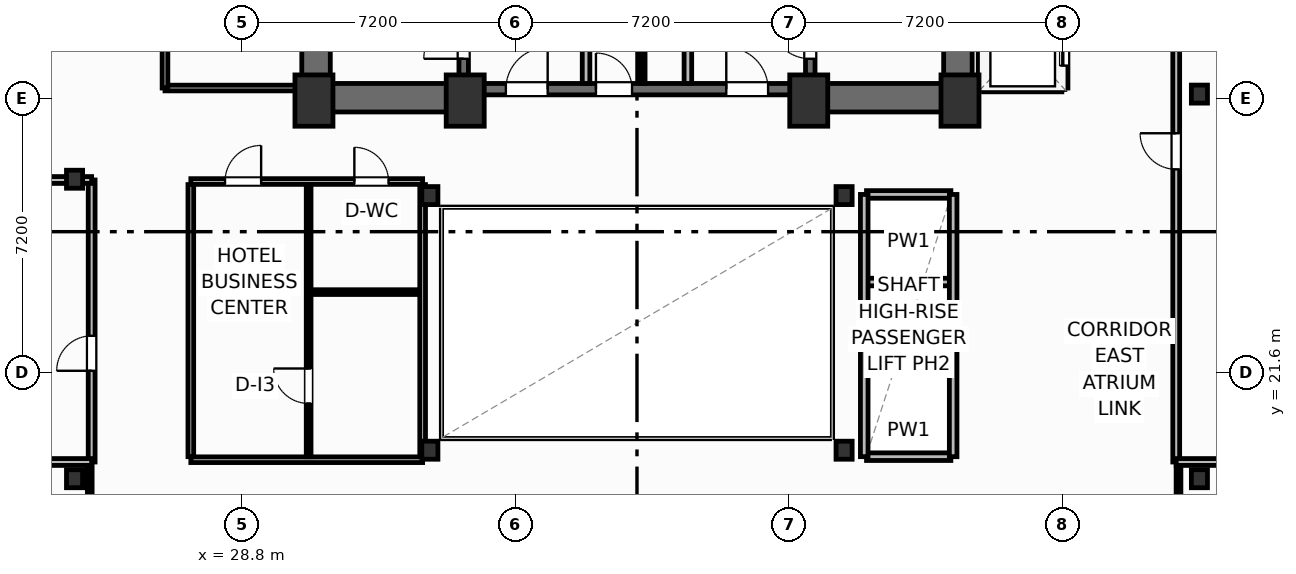
"""IFC4 building model, lengths in metres.
Left out: names, types, materials, properties, quantities, classifications, styles, units other than length and angle.
Written with IfcOpenShell. Run it as: python <this file> out.ifc"""

import sys

from ifc_helpers import new_model, si_unit, direction, frame, frame_2d, origin, origin_2d, place, context, subcontext, project, spatial, rectangle, i_section, extrude, element, fill, save


model = new_model("IFC4")
c1 = context("Model", 3, precision=1e-05, world=origin(), true_north=direction((0.0, 1.0)))
c2 = subcontext(c1, "Body", "Model", "MODEL_VIEW")
j1 = project(units=[si_unit("LENGTHUNIT", "METRE"), si_unit("PLANEANGLEUNIT", "RADIAN")], contexts=[c1])
p1 = place(None, origin())
s1 = spatial("IfcSite", under=j1, at=p1, CompositionType="ELEMENT")
p2 = place(p1, origin())
s2 = spatial("IfcBuilding", under=s1, at=p2, CompositionType="ELEMENT")
p3 = place(p2, frame((0.0, 0.0, 136.5)))
s3 = spatial("IfcBuildingStorey", under=s2, at=p3, CompositionType="ELEMENT", Elevation=136.5)
for number, where, z_axis, x_axis in (
    (1, (30.7, 28.75, 0.0), (0.0, 0.0, 1.0), (1.0, 0.0, 0.0)),
    (2, (34.68, 28.75, 0.0), (0.0, 0.0, 1.0), (1.0, 0.0, 0.0)),
    (3, (43.72, 28.75, 0.0), (0.0, 0.0, 1.0), (1.0, 0.0, 0.0)),
    (4, (47.7, 28.75, 0.0), (0.0, 0.0, 1.0), (1.0, 0.0, 0.0)),
):
    element("IfcColumn", number, at=place(p3, frame(where, z_axis=z_axis, x_axis=x_axis)), inside=s3, PredefinedType="COLUMN", context=c2, shape_type="SweptSolid", body=[
        extrude(rectangle(XDim=1.0, YDim=1.35, at=origin_2d()), origin(), (0.0, 0.0, 1.0), 3.7),
    ])
for number, where, z_axis, x_axis in (
    (5, (33.75, 19.55, 0.0), (0.0, 0.0, 1.0), (1.0, 0.0, 0.0)),
    (6, (44.65, 19.55, 0.0), (0.0, 0.0, 1.0), (1.0, 0.0, 0.0)),
    (7, (33.75, 26.25, 0.0), (0.0, 0.0, 1.0), (1.0, 0.0, 0.0)),
    (8, (44.65, 26.25, 0.0), (0.0, 0.0, 1.0), (1.0, 0.0, 0.0)),
    (9, (24.4, 18.8, 0.0), (0.0, 0.0, 1.0), (1.0, 0.0, 0.0)),
    (10, (24.4, 26.68, 0.0), (0.0, 0.0, 1.0), (1.0, 0.0, 0.0)),
    (11, (54.0, 18.8, 0.0), (0.0, 0.0, 1.0), (1.0, 0.0, 0.0)),
    (12, (54.0, 28.92, 0.0), (0.0, 0.0, 1.0), (1.0, 0.0, 0.0)),
):
    element("IfcColumn", number, at=place(p3, frame(where, z_axis=z_axis, x_axis=x_axis)), inside=s3, PredefinedType="COLUMN", context=c2, shape_type="SweptSolid", body=[
        extrude(i_section(OverallWidth=0.424, OverallDepth=0.474, WebThickness=0.048, FlangeThickness=0.077, FilletRadius=0.025, at=origin_2d()), origin(), (0.0, 0.0, 1.0), 3.7),
    ])
for number, where, z_axis, x_axis in (
    (13, (30.755, 29.2, 0.0), (0.0, 0.0, 1.0), (0.0, 1.0, 0.0)),
    (14, (47.645, 29.2, 0.0), (0.0, 0.0, 1.0), (0.0, 1.0, 0.0)),
):
    element("IfcWall", number, at=place(p3, frame(where, z_axis=z_axis, x_axis=x_axis)), inside=s3, PredefinedType="SHEAR", context=c2, shape_type="SweptSolid", body=[
        extrude(rectangle(XDim=9.22, YDim=0.75, at=frame_2d((4.61, 0.0))), origin(), (0.0, 0.0, 1.0), 3.45),
    ])
p4 = place(p3, frame((30.38, 28.825, 0.0), z_axis=(0.0, 0.0, 1.0), x_axis=(1.0, 0.0, 0.0)))
e15 = element("IfcWall", 15, at=p4, inside=s3, PredefinedType="SHEAR", context=c2, shape_type="SweptSolid", body=[
    extrude(rectangle(XDim=4.42, YDim=0.75, at=frame_2d((2.21, 0.0))), origin(), (0.0, 0.0, 1.0), 3.45),
])
p5 = place(p3, frame((43.6, 28.825, 0.0), z_axis=(0.0, 0.0, 1.0), x_axis=(1.0, 0.0, 0.0)))
e16 = element("IfcWall", 16, at=p5, inside=s3, PredefinedType="SHEAR", context=c2, shape_type="SweptSolid", body=[
    extrude(rectangle(XDim=4.42, YDim=0.75, at=frame_2d((2.21, 0.0))), origin(), (0.0, 0.0, 1.0), 3.45),
])
p6 = place(p3, frame((34.8, 29.05, 0.0), z_axis=(0.0, 0.0, 1.0), x_axis=(1.0, 0.0, 0.0)))
e17 = element("IfcWall", 17, at=p6, inside=s3, PredefinedType="SHEAR", context=c2, shape_type="SweptSolid", body=[
    extrude(rectangle(XDim=8.8, YDim=0.3, at=frame_2d((4.4, 0.0))), origin(), (0.0, 0.0, 1.0), 3.45),
])
p7 = place(p6, frame((0.95, 0.0, 0.0)))
e18 = element("IfcOpeningElement", 18, at=p7, cuts=e17, PredefinedType="OPENING", context=c2, shape_type="SweptSolid", body=[
    extrude(rectangle(XDim=1.1, YDim=2.15, at=frame_2d((0.55, 1.075))), frame((0.0, 0.16, 0.0), z_axis=(0.0, -1.0, 0.0), x_axis=(1.0, 0.0, 0.0)), (0.0, 0.0, 1.0), 0.32),
])
p8 = place(p6, frame((6.75, 0.0, 0.0)))
e19 = element("IfcOpeningElement", 19, at=p8, cuts=e17, PredefinedType="OPENING", context=c2, shape_type="SweptSolid", body=[
    extrude(rectangle(XDim=1.1, YDim=2.15, at=frame_2d((0.55, 1.075))), frame((0.0, 0.16, 0.0), z_axis=(0.0, -1.0, 0.0), x_axis=(1.0, 0.0, 0.0)), (0.0, 0.0, 1.0), 0.32),
])
p9 = place(p6, frame((3.32, 0.0, 0.0)))
e20 = element("IfcOpeningElement", 20, at=p9, cuts=e17, PredefinedType="OPENING", context=c2, shape_type="SweptSolid", body=[
    extrude(rectangle(XDim=0.95, YDim=2.15, at=frame_2d((0.475, 1.075))), frame((0.0, 0.16, 0.0), z_axis=(0.0, -1.0, 0.0), x_axis=(1.0, 0.0, 0.0)), (0.0, 0.0, 1.0), 0.32),
])
p10 = place(p3, frame((34.64, 29.2, 0.0), z_axis=(0.0, 0.0, 1.0), x_axis=(0.0, 1.0, 0.0)))
e21 = element("IfcWall", 21, at=p10, inside=s3, PredefinedType="SHEAR", context=c2, shape_type="SweptSolid", body=[
    extrude(rectangle(XDim=9.22, YDim=0.25, at=frame_2d((4.61, 0.0))), origin(), (0.0, 0.0, 1.0), 3.45),
])
p11 = place(p10, frame((0.65, 0.0, 0.0)))
e22 = element("IfcOpeningElement", 22, at=p11, cuts=e21, PredefinedType="OPENING", context=c2, shape_type="SweptSolid", body=[
    extrude(rectangle(XDim=1.05, YDim=2.15, at=frame_2d((0.525, 1.075))), frame((0.0, 0.135, 0.0), z_axis=(0.0, -1.0, 0.0), x_axis=(1.0, 0.0, 0.0)), (0.0, 0.0, 1.0), 0.27),
])
p12 = place(p3, frame((43.76, 29.2, 0.0), z_axis=(0.0, 0.0, 1.0), x_axis=(0.0, 1.0, 0.0)))
e23 = element("IfcWall", 23, at=p12, inside=s3, PredefinedType="SHEAR", context=c2, shape_type="SweptSolid", body=[
    extrude(rectangle(XDim=9.22, YDim=0.25, at=frame_2d((4.61, 0.0))), origin(), (0.0, 0.0, 1.0), 3.45),
])
p13 = place(p12, frame((0.65, 0.0, 0.0)))
e24 = element("IfcOpeningElement", 24, at=p13, cuts=e23, PredefinedType="OPENING", context=c2, shape_type="SweptSolid", body=[
    extrude(rectangle(XDim=1.05, YDim=2.15, at=frame_2d((0.525, 1.075))), frame((0.0, 0.135, 0.0), z_axis=(0.0, -1.0, 0.0), x_axis=(1.0, 0.0, 0.0)), (0.0, 0.0, 1.0), 0.27),
])
p14 = place(p3, frame((24.8, 16.61, 0.0), z_axis=(0.0, 0.0, 1.0), x_axis=(0.0, 1.0, 0.0)))
e25 = element("IfcWall", 25, at=p14, inside=s3, PredefinedType="PARTITIONING", context=c2, shape_type="SweptSolid", body=[
    extrude(rectangle(XDim=2.63, YDim=0.125, at=frame_2d((1.315, 0.0))), origin(), (0.0, 0.0, 1.0), 2.662),
])
p15 = place(p3, frame((53.45, 16.61, 0.0), z_axis=(0.0, 0.0, 1.0), x_axis=(0.0, 1.0, 0.0)))
e26 = element("IfcWall", 26, at=p15, inside=s3, PredefinedType="PARTITIONING", context=c2, shape_type="SweptSolid", body=[
    extrude(rectangle(XDim=2.63, YDim=0.125, at=frame_2d((1.315, 0.0))), origin(), (0.0, 0.0, 1.0), 3.45),
])
p16 = place(p3, frame((24.85, 19.24, 0.0), z_axis=(0.0, 0.0, 1.0), x_axis=(0.0, 1.0, 0.0)))
e27 = element("IfcWall", 27, at=p16, inside=s3, PredefinedType="PARTITIONING", context=c2, shape_type="SweptSolid", body=[
    extrude(rectangle(XDim=7.42, YDim=0.18, at=frame_2d((3.71, 0.0))), origin(), (0.0, 0.0, 1.0), 3.45),
])
p17 = place(p16, frame((2.4, 0.0, 0.0)))
e28 = element("IfcOpeningElement", 28, at=p17, cuts=e27, PredefinedType="OPENING", context=c2, shape_type="SweptSolid", body=[
    extrude(rectangle(XDim=0.92, YDim=2.05, at=frame_2d((0.46, 1.025))), frame((0.0, 0.1, 0.0), z_axis=(0.0, -1.0, 0.0), x_axis=(1.0, 0.0, 0.0)), (0.0, 0.0, 1.0), 0.2),
])
p18 = place(p3, frame((19.2, 19.24, 0.0), z_axis=(0.0, 0.0, 1.0), x_axis=(1.0, 0.0, 0.0)))
e29 = element("IfcWall", 29, at=p18, inside=s3, PredefinedType="PARTITIONING", context=c2, shape_type="SweptSolid", body=[
    extrude(rectangle(XDim=5.65, YDim=0.18, at=frame_2d((2.825, 0.0))), origin(), (0.0, 0.0, 1.0), 3.45),
])
p19 = place(p3, frame((2.073, 26.66, 0.0), z_axis=(0.0, 0.0, 1.0), x_axis=(1.0, 0.0, 0.0)))
e30 = element("IfcWall", 30, at=p19, inside=s3, PredefinedType="PARTITIONING", context=c2, shape_type="SweptSolid", body=[
    extrude(rectangle(XDim=22.777, YDim=0.18, at=frame_2d((11.388, 0.0))), origin(), (0.0, 0.0, 1.0), 2.662),
])
p20 = place(p3, frame((53.39, 19.24, 0.0), z_axis=(0.0, 0.0, 1.0), x_axis=(0.0, 1.0, 0.0)))
e31 = element("IfcWall", 31, at=p20, inside=s3, PredefinedType="PARTITIONING", context=c2, shape_type="SweptSolid", body=[
    extrude(rectangle(XDim=20.06, YDim=0.18, at=frame_2d((10.03, 0.0))), origin(), (0.0, 0.0, 1.0), 3.45),
])
p21 = place(p20, frame((7.7, 0.0, 0.0)))
e32 = element("IfcOpeningElement", 32, at=p21, cuts=e31, PredefinedType="OPENING", context=c2, shape_type="SweptSolid", body=[
    extrude(rectangle(XDim=0.95, YDim=2.05, at=frame_2d((0.475, 1.025))), frame((0.0, 0.1, 0.0), z_axis=(0.0, -1.0, 0.0), x_axis=(1.0, 0.0, 0.0)), (0.0, 0.0, 1.0), 0.2),
])
p22 = place(p3, frame((53.39, 19.24, 0.0), z_axis=(0.0, 0.0, 1.0), x_axis=(1.0, 0.0, 0.0)))
e33 = element("IfcWall", 33, at=p22, inside=s3, PredefinedType="PARTITIONING", context=c2, shape_type="SweptSolid", body=[
    extrude(rectangle(XDim=22.367, YDim=0.18, at=frame_2d((11.183, 0.0))), origin(), (0.0, 0.0, 1.0), 2.662),
])
for number, where, z_axis, x_axis in (
    (34, (37.86, 29.2, 0.0), (0.0, 0.0, 1.0), (0.0, 1.0, 0.0)),
    (35, (40.54, 29.2, 0.0), (0.0, 0.0, 1.0), (0.0, 1.0, 0.0)),
):
    element("IfcWall", number, at=place(p3, frame(where, z_axis=z_axis, x_axis=x_axis)), inside=s3, PredefinedType="PARTITIONING", context=c2, shape_type="SweptSolid", body=[
        extrude(rectangle(XDim=5.18, YDim=0.2, at=frame_2d((2.59, 0.0))), origin(), (0.0, 0.0, 1.0), 3.45),
    ])
p23 = place(p3, frame((39.35, 29.2, 0.0), z_axis=(0.0, 0.0, 1.0), x_axis=(0.0, 1.0, 0.0)))
e36 = element("IfcWall", 36, at=p23, inside=s3, PredefinedType="PARTITIONING", context=c2, shape_type="SweptSolid", body=[
    extrude(rectangle(XDim=5.22, YDim=0.125, at=frame_2d((2.61, 0.0))), origin(), (0.0, 0.0, 1.0), 3.45),
])
p24 = place(p23, frame((2.05, 0.0, 0.0)))
e37 = element("IfcOpeningElement", 37, at=p24, cuts=e36, PredefinedType="OPENING", context=c2, shape_type="SweptSolid", body=[
    extrude(rectangle(XDim=0.85, YDim=2.05, at=frame_2d((0.425, 1.025))), frame((0.0, 0.073, 0.0), z_axis=(0.0, -1.0, 0.0), x_axis=(1.0, 0.0, 0.0)), (0.0, 0.0, 1.0), 0.145),
])
p25 = place(p3, frame((27.46, 26.62, 0.0), z_axis=(0.0, 0.0, 1.0), x_axis=(1.0, 0.0, 0.0)))
e38 = element("IfcWall", 38, at=p25, inside=s3, PredefinedType="PARTITIONING", context=c2, shape_type="SweptSolid", body=[
    extrude(rectangle(XDim=6.1, YDim=0.15, at=frame_2d((3.05, 0.0))), origin(), (0.0, 0.0, 1.0), 2.662),
])
p26 = place(p25, frame((0.9, 0.0, 0.0)))
e39 = element("IfcOpeningElement", 39, at=p26, cuts=e38, PredefinedType="OPENING", context=c2, shape_type="SweptSolid", body=[
    extrude(rectangle(XDim=0.95, YDim=2.05, at=frame_2d((0.475, 1.025))), frame((0.0, 0.085, 0.0), z_axis=(0.0, -1.0, 0.0), x_axis=(1.0, 0.0, 0.0)), (0.0, 0.0, 1.0), 0.17),
])
p27 = place(p25, frame((4.303, 0.0, 0.0)))
e40 = element("IfcOpeningElement", 40, at=p27, cuts=e38, PredefinedType="OPENING", context=c2, shape_type="SweptSolid", body=[
    extrude(rectangle(XDim=0.9, YDim=2.05, at=frame_2d((0.45, 1.025))), frame((0.0, 0.085, 0.0), z_axis=(0.0, -1.0, 0.0), x_axis=(1.0, 0.0, 0.0)), (0.0, 0.0, 1.0), 0.17),
])
p28 = place(p3, frame((27.46, 19.3, 0.0), z_axis=(0.0, 0.0, 1.0), x_axis=(1.0, 0.0, 0.0)))
e41 = element("IfcWall", 41, at=p28, inside=s3, PredefinedType="PARTITIONING", context=c2, shape_type="SweptSolid", body=[
    extrude(rectangle(XDim=6.1, YDim=0.15, at=frame_2d((3.05, 0.0))), origin(), (0.0, 0.0, 1.0), 2.662),
])
p29 = place(p3, frame((30.56, 19.38, 0.0), z_axis=(0.0, 0.0, 1.0), x_axis=(0.0, 1.0, 0.0)))
e42 = element("IfcWall", 42, at=p29, inside=s3, PredefinedType="PARTITIONING", context=c2, shape_type="SweptSolid", body=[
    extrude(rectangle(XDim=7.16, YDim=0.125, at=frame_2d((3.58, 0.0))), origin(), (0.0, 0.0, 1.0), 3.45),
])
p30 = place(p29, frame((1.4, 0.0, 0.0)))
e43 = element("IfcOpeningElement", 43, at=p30, cuts=e42, PredefinedType="OPENING", context=c2, shape_type="SweptSolid", body=[
    extrude(rectangle(XDim=0.92, YDim=2.05, at=frame_2d((0.46, 1.025))), frame((0.0, 0.073, 0.0), z_axis=(0.0, -1.0, 0.0), x_axis=(1.0, 0.0, 0.0)), (0.0, 0.0, 1.0), 0.145),
])
p31 = place(p3, frame((30.64, 23.71, 0.0), z_axis=(0.0, 0.0, 1.0), x_axis=(1.0, 0.0, 0.0)))
e44 = element("IfcWall", 44, at=p31, inside=s3, PredefinedType="PARTITIONING", context=c2, shape_type="SweptSolid", body=[
    extrude(rectangle(XDim=2.88, YDim=0.125, at=frame_2d((1.44, 0.0))), origin(), (0.0, 0.0, 1.0), 3.45),
])
p32 = place(p3, frame((27.46, 19.38, 0.0), z_axis=(0.0, 0.0, 1.0), x_axis=(0.0, 1.0, 0.0)))
e45 = element("IfcWall", 45, at=p32, inside=s3, PredefinedType="PARTITIONING", context=c2, shape_type="SweptSolid", body=[
    extrude(rectangle(XDim=7.16, YDim=0.15, at=frame_2d((3.58, 0.0))), origin(), (0.0, 0.0, 1.0), 3.45),
])
p33 = place(p3, frame((33.56, 19.38, 0.0), z_axis=(0.0, 0.0, 1.0), x_axis=(0.0, 1.0, 0.0)))
e46 = element("IfcWall", 46, at=p33, inside=s3, PredefinedType="PARTITIONING", context=c2, shape_type="SweptSolid", body=[
    extrude(rectangle(XDim=7.16, YDim=0.15, at=frame_2d((3.58, 0.0))), origin(), (0.0, 0.0, 1.0), 2.824),
])
p34 = place(p3, frame((26.78, 29.08, 0.0), z_axis=(0.0, 0.0, 1.0), x_axis=(1.0, 0.0, 0.0)))
e47 = element("IfcWall", 47, at=p34, inside=s3, PredefinedType="PARTITIONING", context=c2, shape_type="SweptSolid", body=[
    extrude(rectangle(XDim=3.6, YDim=0.15, at=frame_2d((1.8, 0.0))), origin(), (0.0, 0.0, 1.0), 3.45),
])
p35 = place(p3, frame((26.78, 29.08, 0.0), z_axis=(0.0, 0.0, 1.0), x_axis=(0.0, 1.0, 0.0)))
e48 = element("IfcWall", 48, at=p35, inside=s3, PredefinedType="PARTITIONING", context=c2, shape_type="SweptSolid", body=[
    extrude(rectangle(XDim=9.18, YDim=0.15, at=frame_2d((4.59, 0.0))), origin(), (0.0, 0.0, 1.0), 3.45),
])
p36 = place(p35, frame((2.4, 0.0, 0.0)))
e49 = element("IfcOpeningElement", 49, at=p36, cuts=e48, PredefinedType="OPENING", context=c2, shape_type="SweptSolid", body=[
    extrude(rectangle(XDim=0.95, YDim=2.05, at=frame_2d((0.475, 1.025))), frame((0.0, 0.085, 0.0), z_axis=(0.0, -1.0, 0.0), x_axis=(1.0, 0.0, 0.0)), (0.0, 0.0, 1.0), 0.17),
])
p37 = place(p3, frame((48.32, 29.08, 0.0), z_axis=(0.0, 0.0, 1.0), x_axis=(1.0, 0.0, 0.0)))
e50 = element("IfcWall", 50, at=p37, inside=s3, PredefinedType="PARTITIONING", context=c2, shape_type="SweptSolid", body=[
    extrude(rectangle(XDim=2.06, YDim=0.2, at=frame_2d((1.03, 0.0))), origin(), (0.0, 0.0, 1.0), 2.662),
])
p38 = place(p3, frame((48.28, 29.08, 0.0), z_axis=(0.0, 0.0, 1.0), x_axis=(0.0, 1.0, 0.0)))
e51 = element("IfcWall", 51, at=p38, inside=s3, PredefinedType="PARTITIONING", context=c2, shape_type="SweptSolid", body=[
    extrude(rectangle(XDim=6.89, YDim=0.2, at=frame_2d((3.445, 0.0))), origin(), (0.0, 0.0, 1.0), 3.45),
])
p39 = place(p3, frame((50.44, 29.08, 0.0), z_axis=(0.0, 0.0, 1.0), x_axis=(0.0, 1.0, 0.0)))
e52 = element("IfcWall", 52, at=p39, inside=s3, PredefinedType="PARTITIONING", context=c2, shape_type="SweptSolid", body=[
    extrude(rectangle(XDim=6.89, YDim=0.2, at=frame_2d((3.445, 0.0))), origin(), (0.0, 0.0, 1.0), 3.45),
])
p40 = place(p39, frame((0.59, 0.0, 0.0)))
e53 = element("IfcOpeningElement", 53, at=p40, cuts=e52, PredefinedType="OPENING", context=c2, shape_type="SweptSolid", body=[
    extrude(rectangle(XDim=1.1, YDim=2.15, at=frame_2d((0.55, 1.075))), frame((0.0, 0.11, 0.0), z_axis=(0.0, -1.0, 0.0), x_axis=(1.0, 0.0, 0.0)), (0.0, 0.0, 1.0), 0.22),
])
p41 = place(p39, frame((2.89, 0.0, 0.0)))
e54 = element("IfcOpeningElement", 54, at=p41, cuts=e52, PredefinedType="OPENING", context=c2, shape_type="SweptSolid", body=[
    extrude(rectangle(XDim=1.1, YDim=2.15, at=frame_2d((0.55, 1.075))), frame((0.0, 0.11, 0.0), z_axis=(0.0, -1.0, 0.0), x_axis=(1.0, 0.0, 0.0)), (0.0, 0.0, 1.0), 0.22),
])
p42 = place(p39, frame((5.19, 0.0, 0.0)))
e55 = element("IfcOpeningElement", 55, at=p42, cuts=e52, PredefinedType="OPENING", context=c2, shape_type="SweptSolid", body=[
    extrude(rectangle(XDim=1.1, YDim=2.15, at=frame_2d((0.55, 1.075))), frame((0.0, 0.11, 0.0), z_axis=(0.0, -1.0, 0.0), x_axis=(1.0, 0.0, 0.0)), (0.0, 0.0, 1.0), 0.22),
])
for number, where, z_axis, x_axis in (
    (56, (45.24, 21.675, 0.0), (0.0, 0.0, 1.0), (1.0, 0.0, 0.0)),
    (57, (45.24, 23.975, 0.0), (0.0, 0.0, 1.0), (1.0, 0.0, 0.0)),
):
    element("IfcWall", number, at=place(p3, frame(where, z_axis=z_axis, x_axis=x_axis)), inside=s3, PredefinedType="PARTITIONING", context=c2, shape_type="SweptSolid", body=[
        extrude(rectangle(XDim=2.22, YDim=0.2, at=frame_2d((1.11, 0.0))), origin(), (0.0, 0.0, 1.0), 3.45),
    ])
p43 = place(p3, frame((45.24, 19.38, 0.0), z_axis=(0.0, 0.0, 1.0), x_axis=(1.0, 0.0, 0.0)))
e58 = element("IfcWall", 58, at=p43, inside=s3, PredefinedType="PARTITIONING", context=c2, shape_type="SweptSolid", body=[
    extrude(rectangle(XDim=2.22, YDim=0.2, at=frame_2d((1.11, 0.0))), origin(), (0.0, 0.0, 1.0), 2.662),
])
p44 = place(p3, frame((45.24, 26.28, 0.0), z_axis=(0.0, 0.0, 1.0), x_axis=(1.0, 0.0, 0.0)))
e59 = element("IfcWall", 59, at=p44, inside=s3, PredefinedType="PARTITIONING", context=c2, shape_type="SweptSolid", body=[
    extrude(rectangle(XDim=2.22, YDim=0.2, at=frame_2d((1.11, 0.0))), origin(), (0.0, 0.0, 1.0), 3.45),
])
for number, where, z_axis, x_axis in (
    (60, (45.18, 19.38, 0.0), (0.0, 0.0, 1.0), (0.0, 1.0, 0.0)),
    (61, (47.52, 19.38, 0.0), (0.0, 0.0, 1.0), (0.0, 1.0, 0.0)),
):
    element("IfcWall", number, at=place(p3, frame(where, z_axis=z_axis, x_axis=x_axis)), inside=s3, PredefinedType="PARTITIONING", context=c2, shape_type="SweptSolid", body=[
        extrude(rectangle(XDim=6.9, YDim=0.2, at=frame_2d((3.45, 0.0))), origin(), (0.0, 0.0, 1.0), 3.45),
    ])
p45 = place(p17, origin())
e62 = element("IfcDoor", 62, at=p45, inside=s3, OperationType="SINGLE_SWING_LEFT", PredefinedType="DOOR", context=c2, shape_type="SweptSolid", body=[
    extrude(rectangle(XDim=0.92, YDim=2.05, at=frame_2d((0.46, 1.025))), frame((0.0, 0.025, 0.0), z_axis=(0.0, -1.0, 0.0), x_axis=(1.0, 0.0, 0.0)), (0.0, 0.0, 1.0), 0.05),
])
fill(e28, e62)
p46 = place(p21, origin())
e63 = element("IfcDoor", 63, at=p46, inside=s3, OperationType="SINGLE_SWING_RIGHT", PredefinedType="DOOR", context=c2, shape_type="SweptSolid", body=[
    extrude(rectangle(XDim=0.95, YDim=2.05, at=frame_2d((0.475, 1.025))), frame((0.0, 0.025, 0.0), z_axis=(0.0, -1.0, 0.0), x_axis=(1.0, 0.0, 0.0)), (0.0, 0.0, 1.0), 0.05),
])
fill(e32, e63)
p47 = place(p11, origin())
e64 = element("IfcDoor", 64, at=p47, inside=s3, OperationType="SINGLE_SWING_LEFT", PredefinedType="DOOR", context=c2, shape_type="SweptSolid", body=[
    extrude(rectangle(XDim=1.05, YDim=2.15, at=frame_2d((0.525, 1.075))), frame((0.0, 0.025, 0.0), z_axis=(0.0, -1.0, 0.0), x_axis=(1.0, 0.0, 0.0)), (0.0, 0.0, 1.0), 0.05),
])
fill(e22, e64)
p48 = place(p13, origin())
e65 = element("IfcDoor", 65, at=p48, inside=s3, OperationType="SINGLE_SWING_RIGHT", PredefinedType="DOOR", context=c2, shape_type="SweptSolid", body=[
    extrude(rectangle(XDim=1.05, YDim=2.15, at=frame_2d((0.525, 1.075))), frame((0.0, 0.025, 0.0), z_axis=(0.0, -1.0, 0.0), x_axis=(1.0, 0.0, 0.0)), (0.0, 0.0, 1.0), 0.05),
])
fill(e24, e65)
p49 = place(p7, origin())
e66 = element("IfcDoor", 66, at=p49, inside=s3, OperationType="SINGLE_SWING_RIGHT", PredefinedType="DOOR", context=c2, shape_type="SweptSolid", body=[
    extrude(rectangle(XDim=1.1, YDim=2.15, at=frame_2d((0.55, 1.075))), frame((0.0, 0.025, 0.0), z_axis=(0.0, -1.0, 0.0), x_axis=(1.0, 0.0, 0.0)), (0.0, 0.0, 1.0), 0.05),
])
fill(e18, e66)
p50 = place(p8, origin())
e67 = element("IfcDoor", 67, at=p50, inside=s3, OperationType="SINGLE_SWING_LEFT", PredefinedType="DOOR", context=c2, shape_type="SweptSolid", body=[
    extrude(rectangle(XDim=1.1, YDim=2.15, at=frame_2d((0.55, 1.075))), frame((0.0, 0.025, 0.0), z_axis=(0.0, -1.0, 0.0), x_axis=(1.0, 0.0, 0.0)), (0.0, 0.0, 1.0), 0.05),
])
fill(e19, e67)
p51 = place(p9, origin())
e68 = element("IfcDoor", 68, at=p51, inside=s3, OperationType="SINGLE_SWING_LEFT", PredefinedType="DOOR", context=c2, shape_type="SweptSolid", body=[
    extrude(rectangle(XDim=0.95, YDim=2.15, at=frame_2d((0.475, 1.075))), frame((0.0, 0.025, 0.0), z_axis=(0.0, -1.0, 0.0), x_axis=(1.0, 0.0, 0.0)), (0.0, 0.0, 1.0), 0.05),
])
fill(e20, e68)
p52 = place(p26, origin())
e69 = element("IfcDoor", 69, at=p52, inside=s3, OperationType="SINGLE_SWING_RIGHT", PredefinedType="DOOR", context=c2, shape_type="SweptSolid", body=[
    extrude(rectangle(XDim=0.95, YDim=2.05, at=frame_2d((0.475, 1.025))), frame((0.0, 0.025, 0.0), z_axis=(0.0, -1.0, 0.0), x_axis=(1.0, 0.0, 0.0)), (0.0, 0.0, 1.0), 0.05),
])
fill(e39, e69)
p53 = place(p27, origin())
e70 = element("IfcDoor", 70, at=p53, inside=s3, OperationType="SINGLE_SWING_LEFT", PredefinedType="DOOR", context=c2, shape_type="SweptSolid", body=[
    extrude(rectangle(XDim=0.9, YDim=2.05, at=frame_2d((0.45, 1.025))), frame((0.0, 0.025, 0.0), z_axis=(0.0, -1.0, 0.0), x_axis=(1.0, 0.0, 0.0)), (0.0, 0.0, 1.0), 0.05),
])
fill(e40, e70)
p54 = place(p30, origin())
e71 = element("IfcDoor", 71, at=p54, inside=s3, OperationType="SINGLE_SWING_RIGHT", PredefinedType="DOOR", context=c2, shape_type="SweptSolid", body=[
    extrude(rectangle(XDim=0.92, YDim=2.05, at=frame_2d((0.46, 1.025))), frame((0.0, 0.025, 0.0), z_axis=(0.0, -1.0, 0.0), x_axis=(1.0, 0.0, 0.0)), (0.0, 0.0, 1.0), 0.05),
])
fill(e43, e71)
p55 = place(p40, origin())
e72 = element("IfcDoor", 72, at=p55, inside=s3, OperationType="SLIDING_TO_LEFT", PredefinedType="DOOR", context=c2, shape_type="SweptSolid", body=[
    extrude(rectangle(XDim=1.1, YDim=2.15, at=frame_2d((0.55, 1.075))), frame((0.0, 0.025, 0.0), z_axis=(0.0, -1.0, 0.0), x_axis=(1.0, 0.0, 0.0)), (0.0, 0.0, 1.0), 0.05),
])
fill(e53, e72)
save(model, sys.argv[1])
